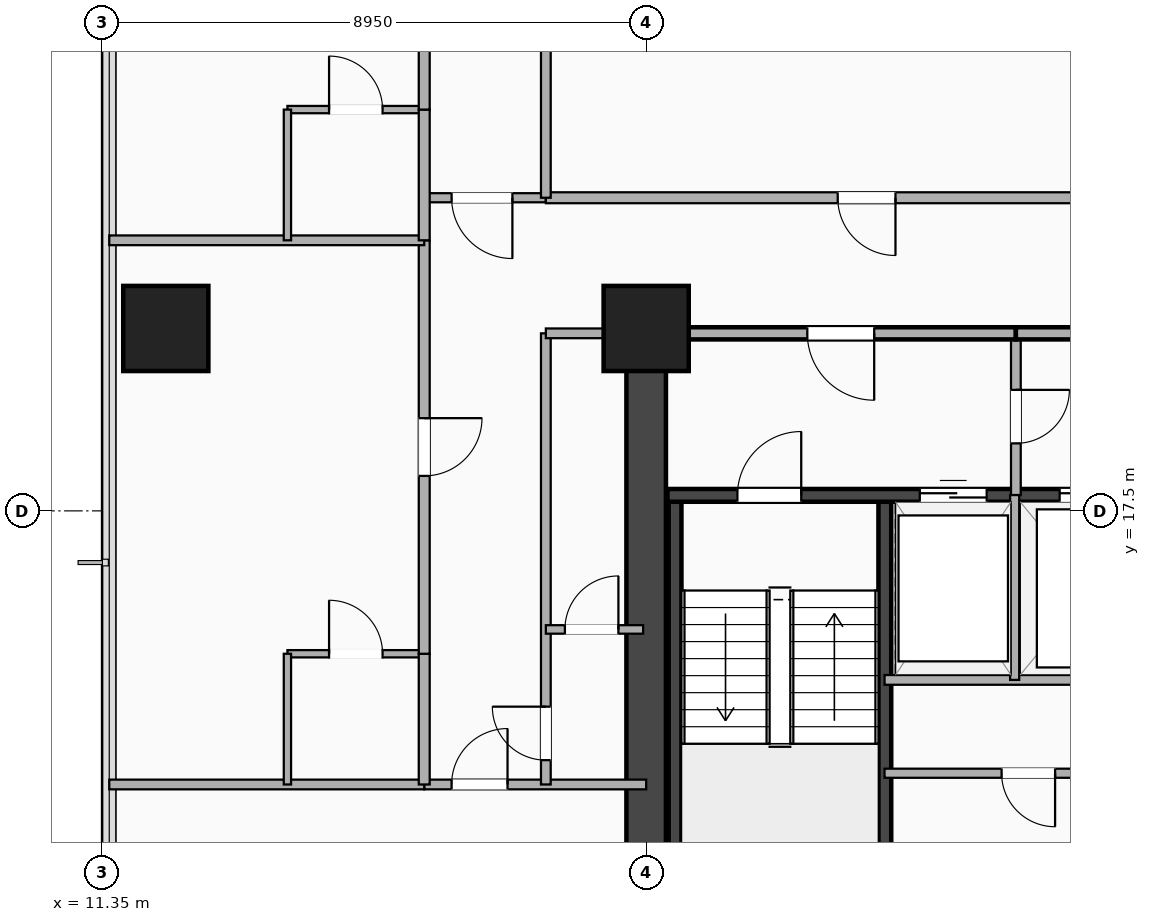
"""IFC4 building model, lengths in metres.
Left out: names, types, materials, properties, quantities, classifications, styles, units other than length and angle.
Written with IfcOpenShell. Run it as: python <this file> out.ifc"""

import sys

from ifc_helpers import new_model, si_unit, direction, frame, frame_2d, origin, origin_2d, place, context, subcontext, project, spatial, rectangle, extrude, element, fill, save


model = new_model("IFC4")
c1 = context("Model", 3, precision=1e-05, world=origin(), true_north=direction((0.0, 1.0)))
c2 = subcontext(c1, "Body", "Model", "MODEL_VIEW")
j1 = project(units=[si_unit("LENGTHUNIT", "METRE"), si_unit("PLANEANGLEUNIT", "RADIAN")], contexts=[c1])
p1 = place(None, origin())
s1 = spatial("IfcSite", under=j1, at=p1, CompositionType="ELEMENT")
p2 = place(p1, origin())
s2 = spatial("IfcBuilding", under=s1, at=p2, CompositionType="ELEMENT")
p3 = place(p2, frame((0.0, 0.0, 50.9)))
s3 = spatial("IfcBuildingStorey", under=s2, at=p3, CompositionType="ELEMENT", Elevation=50.9)
p4 = place(p3, frame((20.3, 3.5, 0.0), z_axis=(0.0, 0.0, 1.0), x_axis=(0.0, 1.0, 0.0)))
e1 = element("IfcWall", 1, at=p4, inside=s3, PredefinedType="SHEAR", context=c2, shape_type="SweptSolid", body=[
    extrude(rectangle(XDim=16.9, YDim=0.65, at=frame_2d((8.45, 0.0))), origin(), (0.0, 0.0, 1.0), 3.22),
])
for number, where, z_axis, x_axis in (
    (2, (20.775, 9.745, 0.0), (0.0, 0.0, 1.0), (0.0, 1.0, 0.0)),
    (3, (24.225, 9.745, 0.0), (0.0, 0.0, 1.0), (0.0, 1.0, 0.0)),
):
    element("IfcWall", number, at=place(p3, frame(where, z_axis=z_axis, x_axis=x_axis)), inside=s3, PredefinedType="SHEAR", context=c2, shape_type="SweptSolid", body=[
        extrude(rectangle(XDim=8.01, YDim=0.21, at=frame_2d((4.005, 0.0))), origin(), (0.0, 0.0, 1.0), 3.22),
    ])
p5 = place(p3, frame((20.65, 17.755, 0.0), z_axis=(0.0, 0.0, 1.0), x_axis=(1.0, 0.0, 0.0)))
e4 = element("IfcWall", 4, at=p5, inside=s3, PredefinedType="SHEAR", context=c2, shape_type="SweptSolid", body=[
    extrude(rectangle(XDim=8.3, YDim=0.21, at=frame_2d((4.15, 0.0))), origin(), (0.0, 0.0, 1.0), 3.22),
])
p6 = place(p5, frame((2.2, 0.0, 0.0), z_axis=(0.0, 0.0, 1.0), x_axis=(-1.0, 0.0, 0.0)))
e5 = element("IfcOpeningElement", 5, at=p6, cuts=e4, PredefinedType="OPENING", context=c2, shape_type="SweptSolid", body=[
    extrude(rectangle(XDim=1.05, YDim=2.15, at=frame_2d((0.525, 1.075))), frame((0.0, 0.115, 0.0), z_axis=(0.0, -1.0, 0.0), x_axis=(1.0, 0.0, 0.0)), (0.0, 0.0, 1.0), 0.23),
])
p7 = place(p5, frame((4.15, 0.0, 0.0)))
e6 = element("IfcOpeningElement", 6, at=p7, cuts=e4, PredefinedType="OPENING", context=c2, shape_type="SweptSolid", body=[
    extrude(rectangle(XDim=1.1, YDim=2.18, at=frame_2d((0.55, 1.09))), frame((0.0, 0.115, 0.0), z_axis=(0.0, -1.0, 0.0), x_axis=(1.0, 0.0, 0.0)), (0.0, 0.0, 1.0), 0.23),
])
p8 = place(p5, frame((6.45, 0.0, 0.0)))
e7 = element("IfcOpeningElement", 7, at=p8, cuts=e4, PredefinedType="OPENING", context=c2, shape_type="SweptSolid", body=[
    extrude(rectangle(XDim=1.12, YDim=2.2, at=frame_2d((0.56, 1.1))), frame((0.0, 0.115, 0.0), z_axis=(0.0, -1.0, 0.0), x_axis=(1.0, 0.0, 0.0)), (0.0, 0.0, 1.0), 0.23),
])
for number, where, z_axis, x_axis in (
    (8, (20.3, 20.5, -0.28), (0.0, 0.0, 1.0), (1.0, 0.0, 0.0)),
    (9, (12.4, 20.5, -0.28), (0.0, 0.0, 1.0), (1.0, 0.0, 0.0)),
):
    element("IfcColumn", number, at=place(p3, frame(where, z_axis=z_axis, x_axis=x_axis)), inside=s3, PredefinedType="COLUMN", context=c2, shape_type="SweptSolid", body=[
        extrude(rectangle(XDim=1.4, YDim=1.4, at=origin_2d()), origin(), (0.0, 0.0, 1.0), 3.5),
    ])
p9 = place(p3, frame((26.38, 17.76, 0.0), z_axis=(0.0, 0.0, 1.0), x_axis=(0.0, 1.0, 0.0)))
e10 = element("IfcWall", 10, at=p9, inside=s3, PredefinedType="PARTITIONING", context=c2, shape_type="SweptSolid", body=[
    extrude(rectangle(XDim=2.66, YDim=0.16, at=frame_2d((1.33, 0.0))), origin(), (0.0, 0.0, 1.0), 2.51),
])
p10 = place(p9, frame((0.85, 0.0, 0.0)))
e11 = element("IfcOpeningElement", 11, at=p10, cuts=e10, PredefinedType="OPENING", context=c2, shape_type="SweptSolid", body=[
    extrude(rectangle(XDim=0.88, YDim=2.08, at=frame_2d((0.44, 1.04))), frame((0.0, 0.09, 0.0), z_axis=(0.0, -1.0, 0.0), x_axis=(1.0, 0.0, 0.0)), (0.0, 0.0, 1.0), 0.18),
])
p11 = place(p3, frame((24.22, 14.72, 0.0), z_axis=(0.0, 0.0, 1.0), x_axis=(1.0, 0.0, 0.0)))
e12 = element("IfcWall", 12, at=p11, inside=s3, PredefinedType="PARTITIONING", context=c2, shape_type="SweptSolid", body=[
    extrude(rectangle(XDim=4.73, YDim=0.16, at=frame_2d((2.365, 0.0))), origin(), (0.0, 0.0, 1.0), 3.22),
])
p12 = place(p3, frame((26.36, 14.72, 0.0), z_axis=(0.0, 0.0, 1.0), x_axis=(0.0, 1.0, 0.0)))
e13 = element("IfcWall", 13, at=p12, inside=s3, PredefinedType="PARTITIONING", context=c2, shape_type="SweptSolid", body=[
    extrude(rectangle(XDim=3.04, YDim=0.15, at=frame_2d((1.52, 0.0))), origin(), (0.0, 0.0, 1.0), 3.22),
])
p13 = place(p3, frame((20.65, 20.42, 0.0), z_axis=(0.0, 0.0, 1.0), x_axis=(1.0, 0.0, 0.0)))
e14 = element("IfcWall", 14, at=p13, inside=s3, PredefinedType="PARTITIONING", context=c2, shape_type="SweptSolid", body=[
    extrude(rectangle(XDim=5.73, YDim=0.2, at=frame_2d((2.865, 0.0))), origin(), (0.0, 0.0, 1.0), 2.51),
])
p14 = place(p13, frame((2.3, 0.0, 0.0)))
e15 = element("IfcOpeningElement", 15, at=p14, cuts=e14, PredefinedType="OPENING", context=c2, shape_type="SweptSolid", body=[
    extrude(rectangle(XDim=1.1, YDim=2.15, at=frame_2d((0.55, 1.075))), frame((0.0, 0.11, 0.0), z_axis=(0.0, -1.0, 0.0), x_axis=(1.0, 0.0, 0.0)), (0.0, 0.0, 1.0), 0.22),
])
p15 = place(p3, frame((26.38, 20.42, 0.0), z_axis=(0.0, 0.0, 1.0), x_axis=(1.0, 0.0, 0.0)))
e16 = element("IfcWall", 16, at=p15, inside=s3, PredefinedType="PARTITIONING", context=c2, shape_type="SweptSolid", body=[
    extrude(rectangle(XDim=2.82, YDim=0.2, at=frame_2d((1.41, 0.0))), origin(), (0.0, 0.0, 1.0), 2.51),
])
p16 = place(p3, frame((24.22, 13.185, 0.0), z_axis=(0.0, 0.0, 1.0), x_axis=(1.0, 0.0, 0.0)))
e17 = element("IfcWall", 17, at=p16, inside=s3, PredefinedType="PARTITIONING", context=c2, shape_type="SweptSolid", body=[
    extrude(rectangle(XDim=4.73, YDim=0.15, at=frame_2d((2.365, 0.0))), origin(), (0.0, 0.0, 1.0), 3.22),
])
p17 = place(p16, frame((1.925, 0.0, 0.0)))
e18 = element("IfcOpeningElement", 18, at=p17, cuts=e17, PredefinedType="OPENING", context=c2, shape_type="SweptSolid", body=[
    extrude(rectangle(XDim=0.88, YDim=2.08, at=frame_2d((0.44, 1.04))), frame((0.0, 0.085, 0.0), z_axis=(0.0, -1.0, 0.0), x_axis=(1.0, 0.0, 0.0)), (0.0, 0.0, 1.0), 0.17),
])
p18 = place(p3, frame((16.65, 13.0, 0.0), z_axis=(0.0, 0.0, 1.0), x_axis=(1.0, 0.0, 0.0)))
e19 = element("IfcWall", 19, at=p18, inside=s3, PredefinedType="PARTITIONING", context=c2, shape_type="SweptSolid", body=[
    extrude(rectangle(XDim=3.65, YDim=0.16, at=frame_2d((1.825, 0.0))), origin(), (0.0, 0.0, 1.0), 2.51),
])
p19 = place(p18, frame((1.37, 0.0, 0.0), z_axis=(0.0, 0.0, 1.0), x_axis=(-1.0, 0.0, 0.0)))
e20 = element("IfcOpeningElement", 20, at=p19, cuts=e19, PredefinedType="OPENING", context=c2, shape_type="SweptSolid", body=[
    extrude(rectangle(XDim=0.92, YDim=2.08, at=frame_2d((0.46, 1.04))), frame((0.0, 0.09, 0.0), z_axis=(0.0, -1.0, 0.0), x_axis=(1.0, 0.0, 0.0)), (0.0, 0.0, 1.0), 0.18),
])
p20 = place(p3, frame((18.65, 13.0, 0.0), z_axis=(0.0, 0.0, 1.0), x_axis=(0.0, 1.0, 0.0)))
e21 = element("IfcWall", 21, at=p20, inside=s3, PredefinedType="PARTITIONING", context=c2, shape_type="SweptSolid", body=[
    extrude(rectangle(XDim=7.42, YDim=0.16, at=frame_2d((3.71, 0.0))), origin(), (0.0, 0.0, 1.0), 2.51),
])
p21 = place(p20, frame((1.28, 0.0, 0.0), z_axis=(0.0, 0.0, 1.0), x_axis=(-1.0, 0.0, 0.0)))
e22 = element("IfcOpeningElement", 22, at=p21, cuts=e21, PredefinedType="OPENING", context=c2, shape_type="SweptSolid", body=[
    extrude(rectangle(XDim=0.88, YDim=2.08, at=frame_2d((0.44, 1.04))), frame((0.0, 0.09, 0.0), z_axis=(0.0, -1.0, 0.0), x_axis=(1.0, 0.0, 0.0)), (0.0, 0.0, 1.0), 0.18),
])
p22 = place(p3, frame((18.65, 20.42, 0.0), z_axis=(0.0, 0.0, 1.0), x_axis=(1.0, 0.0, 0.0)))
e23 = element("IfcWall", 23, at=p22, inside=s3, PredefinedType="PARTITIONING", context=c2, shape_type="SweptSolid", body=[
    extrude(rectangle(XDim=1.65, YDim=0.16, at=frame_2d((0.825, 0.0))), origin(), (0.0, 0.0, 1.0), 2.51),
])
p23 = place(p3, frame((16.65, 22.65, 0.0), z_axis=(0.0, 0.0, 1.0), x_axis=(1.0, 0.0, 0.0)))
e24 = element("IfcWall", 24, at=p23, inside=s3, PredefinedType="PARTITIONING", context=c2, shape_type="SweptSolid", body=[
    extrude(rectangle(XDim=2.0, YDim=0.15, at=frame_2d((1.0, 0.0))), origin(), (0.0, 0.0, 1.0), 3.22),
])
p24 = place(p23, frame((0.45, 0.0, 0.0)))
e25 = element("IfcOpeningElement", 25, at=p24, cuts=e24, PredefinedType="OPENING", context=c2, shape_type="SweptSolid", body=[
    extrude(rectangle(XDim=1.0, YDim=2.15, at=frame_2d((0.5, 1.075))), frame((0.0, 0.085, 0.0), z_axis=(0.0, -1.0, 0.0), x_axis=(1.0, 0.0, 0.0)), (0.0, 0.0, 1.0), 0.17),
])
p25 = place(p3, frame((18.65, 22.65, 0.0), z_axis=(0.0, 0.0, 1.0), x_axis=(1.0, 0.0, 0.0)))
e26 = element("IfcWall", 26, at=p25, inside=s3, PredefinedType="PARTITIONING", context=c2, shape_type="SweptSolid", body=[
    extrude(rectangle(XDim=10.55, YDim=0.18, at=frame_2d((5.275, 0.0))), origin(), (0.0, 0.0, 1.0), 2.51),
])
p26 = place(p25, frame((4.8, 0.0, 0.0)))
e27 = element("IfcOpeningElement", 27, at=p26, cuts=e26, PredefinedType="OPENING", context=c2, shape_type="SweptSolid", body=[
    extrude(rectangle(XDim=0.95, YDim=2.15, at=frame_2d((0.475, 1.075))), frame((0.0, 0.1, 0.0), z_axis=(0.0, -1.0, 0.0), x_axis=(1.0, 0.0, 0.0)), (0.0, 0.0, 1.0), 0.2),
])
p27 = place(p3, frame((18.65, 22.65, 0.0), z_axis=(0.0, 0.0, 1.0), x_axis=(0.0, 1.0, 0.0)))
e28 = element("IfcWall", 28, at=p27, inside=s3, PredefinedType="PARTITIONING", context=c2, shape_type="SweptSolid", body=[
    extrude(rectangle(XDim=8.25, YDim=0.16, at=frame_2d((4.125, 0.0))), origin(), (0.0, 0.0, 1.0), 2.788),
])
p28 = place(p3, frame((11.47, 13.0, 0.0), z_axis=(0.0, 0.0, 1.0), x_axis=(1.0, 0.0, 0.0)))
e29 = element("IfcWall", 29, at=p28, inside=s3, PredefinedType="PARTITIONING", context=c2, shape_type="SweptSolid", body=[
    extrude(rectangle(XDim=5.18, YDim=0.16, at=frame_2d((2.59, 0.0))), origin(), (0.0, 0.0, 1.0), 2.583),
])
p29 = place(p3, frame((14.4, 15.15, 0.0), z_axis=(0.0, 0.0, 1.0), x_axis=(1.0, 0.0, 0.0)))
e30 = element("IfcWall", 30, at=p29, inside=s3, PredefinedType="PARTITIONING", context=c2, shape_type="SweptSolid", body=[
    extrude(rectangle(XDim=2.25, YDim=0.12, at=frame_2d((1.125, 0.0))), origin(), (0.0, 0.0, 1.0), 3.22),
])
p30 = place(p29, frame((1.565, 0.0, 0.0), z_axis=(0.0, 0.0, 1.0), x_axis=(-1.0, 0.0, 0.0)))
e31 = element("IfcOpeningElement", 31, at=p30, cuts=e30, PredefinedType="OPENING", context=c2, shape_type="SweptSolid", body=[
    extrude(rectangle(XDim=0.88, YDim=2.08, at=frame_2d((0.44, 1.04))), frame((0.0, 0.07, 0.0), z_axis=(0.0, -1.0, 0.0), x_axis=(1.0, 0.0, 0.0)), (0.0, 0.0, 1.0), 0.14),
])
p31 = place(p3, frame((14.4, 13.0, 0.0), z_axis=(0.0, 0.0, 1.0), x_axis=(0.0, 1.0, 0.0)))
e32 = element("IfcWall", 32, at=p31, inside=s3, PredefinedType="PARTITIONING", context=c2, shape_type="SweptSolid", body=[
    extrude(rectangle(XDim=2.15, YDim=0.12, at=frame_2d((1.075, 0.0))), origin(), (0.0, 0.0, 1.0), 2.902),
])
p32 = place(p3, frame((16.65, 13.0, 0.0), z_axis=(0.0, 0.0, 1.0), x_axis=(0.0, 1.0, 0.0)))
e33 = element("IfcWall", 33, at=p32, inside=s3, PredefinedType="PARTITIONING", context=c2, shape_type="SweptSolid", body=[
    extrude(rectangle(XDim=2.15, YDim=0.18, at=frame_2d((1.075, 0.0))), origin(), (0.0, 0.0, 1.0), 2.902),
])
p33 = place(p3, frame((16.65, 15.15, 0.0), z_axis=(0.0, 0.0, 1.0), x_axis=(0.0, 1.0, 0.0)))
e34 = element("IfcWall", 34, at=p33, inside=s3, PredefinedType="PARTITIONING", context=c2, shape_type="SweptSolid", body=[
    extrude(rectangle(XDim=6.8, YDim=0.18, at=frame_2d((3.4, 0.0))), origin(), (0.0, 0.0, 1.0), 2.51),
])
p34 = place(p33, frame((2.925, 0.0, 0.0)))
e35 = element("IfcOpeningElement", 35, at=p34, cuts=e34, PredefinedType="OPENING", context=c2, shape_type="SweptSolid", body=[
    extrude(rectangle(XDim=0.95, YDim=2.15, at=frame_2d((0.475, 1.075))), frame((0.0, 0.1, 0.0), z_axis=(0.0, -1.0, 0.0), x_axis=(1.0, 0.0, 0.0)), (0.0, 0.0, 1.0), 0.2),
])
p35 = place(p3, frame((11.47, 21.95, 0.0), z_axis=(0.0, 0.0, 1.0), x_axis=(1.0, 0.0, 0.0)))
e36 = element("IfcWall", 36, at=p35, inside=s3, PredefinedType="PARTITIONING", context=c2, shape_type="SweptSolid", body=[
    extrude(rectangle(XDim=5.18, YDim=0.16, at=frame_2d((2.59, 0.0))), origin(), (0.0, 0.0, 1.0), 2.583),
])
p36 = place(p3, frame((14.4, 24.1, 0.0), z_axis=(0.0, 0.0, 1.0), x_axis=(1.0, 0.0, 0.0)))
e37 = element("IfcWall", 37, at=p36, inside=s3, PredefinedType="PARTITIONING", context=c2, shape_type="SweptSolid", body=[
    extrude(rectangle(XDim=2.25, YDim=0.12, at=frame_2d((1.125, 0.0))), origin(), (0.0, 0.0, 1.0), 3.22),
])
p37 = place(p36, frame((1.565, 0.0, 0.0), z_axis=(0.0, 0.0, 1.0), x_axis=(-1.0, 0.0, 0.0)))
e38 = element("IfcOpeningElement", 38, at=p37, cuts=e37, PredefinedType="OPENING", context=c2, shape_type="SweptSolid", body=[
    extrude(rectangle(XDim=0.88, YDim=2.08, at=frame_2d((0.44, 1.04))), frame((0.0, 0.07, 0.0), z_axis=(0.0, -1.0, 0.0), x_axis=(1.0, 0.0, 0.0)), (0.0, 0.0, 1.0), 0.14),
])
p38 = place(p3, frame((14.4, 21.95, 0.0), z_axis=(0.0, 0.0, 1.0), x_axis=(0.0, 1.0, 0.0)))
e39 = element("IfcWall", 39, at=p38, inside=s3, PredefinedType="PARTITIONING", context=c2, shape_type="SweptSolid", body=[
    extrude(rectangle(XDim=2.15, YDim=0.12, at=frame_2d((1.075, 0.0))), origin(), (0.0, 0.0, 1.0), 3.22),
])
p39 = place(p3, frame((16.65, 21.95, 0.0), z_axis=(0.0, 0.0, 1.0), x_axis=(0.0, 1.0, 0.0)))
e40 = element("IfcWall", 40, at=p39, inside=s3, PredefinedType="PARTITIONING", context=c2, shape_type="SweptSolid", body=[
    extrude(rectangle(XDim=2.15, YDim=0.18, at=frame_2d((1.075, 0.0))), origin(), (0.0, 0.0, 1.0), 3.22),
])
p40 = place(p3, frame((16.65, 24.1, 0.0), z_axis=(0.0, 0.0, 1.0), x_axis=(0.0, 1.0, 0.0)))
e41 = element("IfcWall", 41, at=p40, inside=s3, PredefinedType="PARTITIONING", context=c2, shape_type="SweptSolid", body=[
    extrude(rectangle(XDim=6.8, YDim=0.18, at=frame_2d((3.4, 0.0))), origin(), (0.0, 0.0, 1.0), 2.788),
])
p41 = place(p40, frame((2.925, 0.0, 0.0)))
e42 = element("IfcOpeningElement", 42, at=p41, cuts=e41, PredefinedType="OPENING", context=c2, shape_type="SweptSolid", body=[
    extrude(rectangle(XDim=0.95, YDim=2.15, at=frame_2d((0.475, 1.075))), frame((0.0, 0.1, 0.0), z_axis=(0.0, -1.0, 0.0), x_axis=(1.0, 0.0, 0.0)), (0.0, 0.0, 1.0), 0.2),
])
p42 = place(p3, frame((18.65, 15.55, 0.0), z_axis=(0.0, 0.0, 1.0), x_axis=(1.0, 0.0, 0.0)))
e43 = element("IfcWall", 43, at=p42, inside=s3, PredefinedType="PARTITIONING", context=c2, shape_type="SweptSolid", body=[
    extrude(rectangle(XDim=1.6, YDim=0.14, at=frame_2d((0.8, 0.0))), origin(), (0.0, 0.0, 1.0), 2.51),
])
p43 = place(p42, frame((1.193, 0.0, 0.0), z_axis=(0.0, 0.0, 1.0), x_axis=(-1.0, 0.0, 0.0)))
e44 = element("IfcOpeningElement", 44, at=p43, cuts=e43, PredefinedType="OPENING", context=c2, shape_type="SweptSolid", body=[
    extrude(rectangle(XDim=0.88, YDim=2.08, at=frame_2d((0.44, 1.04))), frame((0.0, 0.08, 0.0), z_axis=(0.0, -1.0, 0.0), x_axis=(1.0, 0.0, 0.0)), (0.0, 0.0, 1.0), 0.16),
])
p44 = place(p6, origin())
e45 = element("IfcDoor", 45, at=p44, inside=s3, OperationType="SINGLE_SWING_RIGHT", PredefinedType="DOOR", context=c2, shape_type="SweptSolid", body=[
    extrude(rectangle(XDim=1.05, YDim=2.15, at=frame_2d((0.525, 1.075))), frame((0.0, 0.025, 0.0), z_axis=(0.0, -1.0, 0.0), x_axis=(1.0, 0.0, 0.0)), (0.0, 0.0, 1.0), 0.05),
])
fill(e5, e45)
p45 = place(p7, origin())
e46 = element("IfcDoor", 46, at=p45, inside=s3, OperationType="DOUBLE_DOOR_SLIDING", PredefinedType="DOOR", context=c2, shape_type="SweptSolid", body=[
    extrude(rectangle(XDim=1.1, YDim=2.18, at=frame_2d((0.55, 1.09))), frame((0.0, 0.025, 0.0), z_axis=(0.0, -1.0, 0.0), x_axis=(1.0, 0.0, 0.0)), (0.0, 0.0, 1.0), 0.05),
])
fill(e6, e46)
p46 = place(p8, origin())
e47 = element("IfcDoor", 47, at=p46, inside=s3, OperationType="DOUBLE_DOOR_SLIDING", PredefinedType="DOOR", context=c2, shape_type="SweptSolid", body=[
    extrude(rectangle(XDim=1.12, YDim=2.2, at=frame_2d((0.56, 1.1))), frame((0.0, 0.025, 0.0), z_axis=(0.0, -1.0, 0.0), x_axis=(1.0, 0.0, 0.0)), (0.0, 0.0, 1.0), 0.05),
])
fill(e7, e47)
p47 = place(p10, origin())
e48 = element("IfcDoor", 48, at=p47, inside=s3, OperationType="SINGLE_SWING_RIGHT", PredefinedType="DOOR", context=c2, shape_type="SweptSolid", body=[
    extrude(rectangle(XDim=0.88, YDim=2.08, at=frame_2d((0.44, 1.04))), frame((0.0, 0.025, 0.0), z_axis=(0.0, -1.0, 0.0), x_axis=(1.0, 0.0, 0.0)), (0.0, 0.0, 1.0), 0.05),
])
fill(e11, e48)
p48 = place(p14, origin())
e49 = element("IfcDoor", 49, at=p48, inside=s3, OperationType="SINGLE_SWING_RIGHT", PredefinedType="DOOR", context=c2, shape_type="SweptSolid", body=[
    extrude(rectangle(XDim=1.1, YDim=2.15, at=frame_2d((0.55, 1.075))), frame((0.0, 0.025, 0.0), z_axis=(0.0, -1.0, 0.0), x_axis=(1.0, 0.0, 0.0)), (0.0, 0.0, 1.0), 0.05),
])
fill(e15, e49)
p49 = place(p17, origin())
e50 = element("IfcDoor", 50, at=p49, inside=s3, OperationType="SINGLE_SWING_RIGHT", PredefinedType="DOOR", context=c2, shape_type="SweptSolid", body=[
    extrude(rectangle(XDim=0.88, YDim=2.08, at=frame_2d((0.44, 1.04))), frame((0.0, 0.025, 0.0), z_axis=(0.0, -1.0, 0.0), x_axis=(1.0, 0.0, 0.0)), (0.0, 0.0, 1.0), 0.05),
])
fill(e18, e50)
p50 = place(p19, origin())
e51 = element("IfcDoor", 51, at=p50, inside=s3, OperationType="SINGLE_SWING_RIGHT", PredefinedType="DOOR", context=c2, shape_type="SweptSolid", body=[
    extrude(rectangle(XDim=0.92, YDim=2.08, at=frame_2d((0.46, 1.04))), frame((0.0, 0.025, 0.0), z_axis=(0.0, -1.0, 0.0), x_axis=(1.0, 0.0, 0.0)), (0.0, 0.0, 1.0), 0.05),
])
fill(e20, e51)
p51 = place(p21, origin())
e52 = element("IfcDoor", 52, at=p51, inside=s3, OperationType="SINGLE_SWING_RIGHT", PredefinedType="DOOR", context=c2, shape_type="SweptSolid", body=[
    extrude(rectangle(XDim=0.88, YDim=2.08, at=frame_2d((0.44, 1.04))), frame((0.0, 0.025, 0.0), z_axis=(0.0, -1.0, 0.0), x_axis=(1.0, 0.0, 0.0)), (0.0, 0.0, 1.0), 0.05),
])
fill(e22, e52)
p52 = place(p24, origin())
e53 = element("IfcDoor", 53, at=p52, inside=s3, OperationType="SINGLE_SWING_RIGHT", PredefinedType="DOOR", context=c2, shape_type="SweptSolid", body=[
    extrude(rectangle(XDim=1.0, YDim=2.15, at=frame_2d((0.5, 1.075))), frame((0.0, 0.025, 0.0), z_axis=(0.0, -1.0, 0.0), x_axis=(1.0, 0.0, 0.0)), (0.0, 0.0, 1.0), 0.05),
])
fill(e25, e53)
p53 = place(p26, origin())
e54 = element("IfcDoor", 54, at=p53, inside=s3, OperationType="SINGLE_SWING_RIGHT", PredefinedType="DOOR", context=c2, shape_type="SweptSolid", body=[
    extrude(rectangle(XDim=0.95, YDim=2.15, at=frame_2d((0.475, 1.075))), frame((0.0, 0.025, 0.0), z_axis=(0.0, -1.0, 0.0), x_axis=(1.0, 0.0, 0.0)), (0.0, 0.0, 1.0), 0.05),
])
fill(e27, e54)
p54 = place(p30, origin())
e55 = element("IfcDoor", 55, at=p54, inside=s3, OperationType="SINGLE_SWING_LEFT", PredefinedType="DOOR", context=c2, shape_type="SweptSolid", body=[
    extrude(rectangle(XDim=0.88, YDim=2.08, at=frame_2d((0.44, 1.04))), frame((0.0, 0.025, 0.0), z_axis=(0.0, -1.0, 0.0), x_axis=(1.0, 0.0, 0.0)), (0.0, 0.0, 1.0), 0.05),
])
fill(e31, e55)
p55 = place(p34, origin())
e56 = element("IfcDoor", 56, at=p55, inside=s3, OperationType="SINGLE_SWING_RIGHT", PredefinedType="DOOR", context=c2, shape_type="SweptSolid", body=[
    extrude(rectangle(XDim=0.95, YDim=2.15, at=frame_2d((0.475, 1.075))), frame((0.0, 0.025, 0.0), z_axis=(0.0, -1.0, 0.0), x_axis=(1.0, 0.0, 0.0)), (0.0, 0.0, 1.0), 0.05),
])
fill(e35, e56)
p56 = place(p37, origin())
e57 = element("IfcDoor", 57, at=p56, inside=s3, OperationType="SINGLE_SWING_LEFT", PredefinedType="DOOR", context=c2, shape_type="SweptSolid", body=[
    extrude(rectangle(XDim=0.88, YDim=2.08, at=frame_2d((0.44, 1.04))), frame((0.0, 0.025, 0.0), z_axis=(0.0, -1.0, 0.0), x_axis=(1.0, 0.0, 0.0)), (0.0, 0.0, 1.0), 0.05),
])
fill(e38, e57)
p57 = place(p43, origin())
e58 = element("IfcDoor", 58, at=p57, inside=s3, OperationType="SINGLE_SWING_RIGHT", PredefinedType="DOOR", context=c2, shape_type="SweptSolid", body=[
    extrude(rectangle(XDim=0.88, YDim=2.08, at=frame_2d((0.44, 1.04))), frame((0.0, 0.025, 0.0), z_axis=(0.0, -1.0, 0.0), x_axis=(1.0, 0.0, 0.0)), (0.0, 0.0, 1.0), 0.05),
])
fill(e44, e58)
save(model, sys.argv[1])
